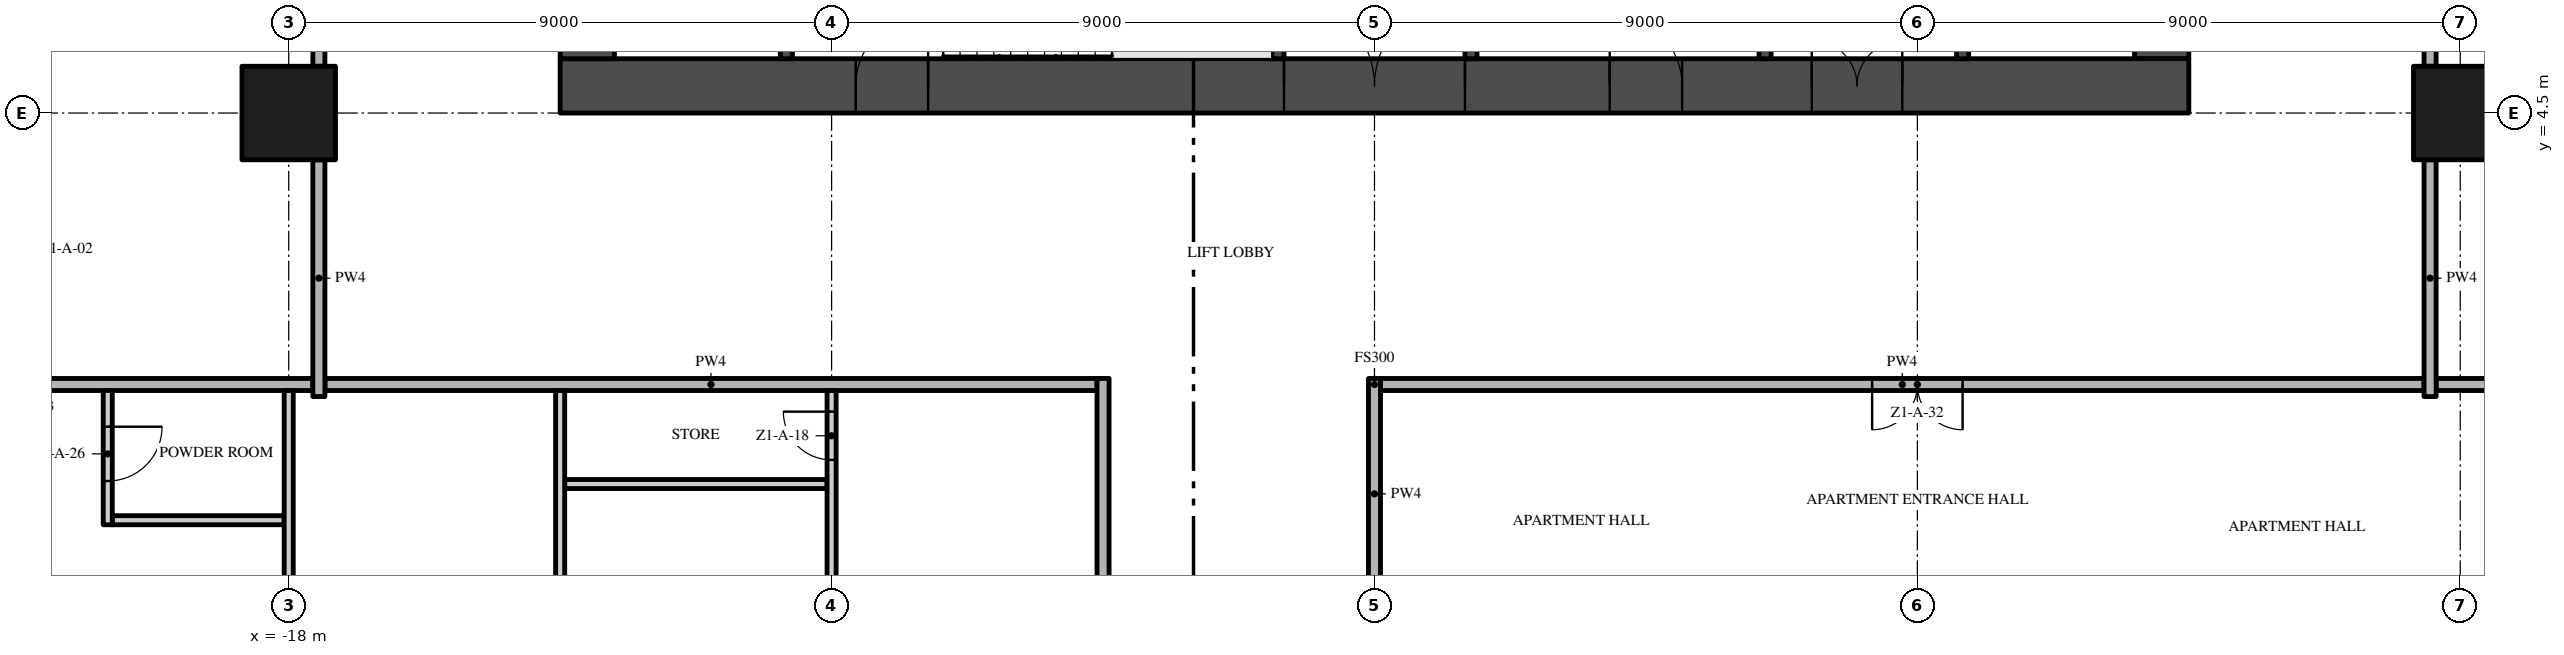
"""IFC4 building model, lengths in metres.
Left out: names, types, materials, properties, quantities, classifications, styles, units other than length and angle.
Written with IfcOpenShell. Run it as: python <this file> out.ifc"""

import sys

from ifc_helpers import new_model, si_unit, direction, frame, frame_2d, origin, origin_2d, place, context, subcontext, project, spatial, rectangle, extrude, element, fill, save


model = new_model("IFC4")
c1 = context("Model", 3, precision=1e-05, world=origin(), true_north=direction((0.0, 1.0)))
c2 = subcontext(c1, "Body", "Model", "MODEL_VIEW")
j1 = project(units=[si_unit("LENGTHUNIT", "METRE"), si_unit("PLANEANGLEUNIT", "RADIAN")], contexts=[c1])
p1 = place(None, origin())
s1 = spatial("IfcSite", under=j1, at=p1, CompositionType="ELEMENT")
p2 = place(p1, origin())
s2 = spatial("IfcBuilding", under=s1, at=p2, CompositionType="ELEMENT")
p3 = place(p2, frame((0.0, 0.0, 22.6)))
s3 = spatial("IfcBuildingStorey", under=s2, at=p3, CompositionType="ELEMENT", Elevation=22.6)
p4 = place(p3, frame((-13.5, 4.95, -0.3), z_axis=(0.0, 0.0, 1.0), x_axis=(1.0, 0.0, 0.0)))
e1 = element("IfcWall", 1, at=p4, inside=s3, PredefinedType="SHEAR", context=c2, shape_type="SweptSolid", body=[
    extrude(rectangle(XDim=27.0, YDim=0.9, at=frame_2d((13.5, 0.0))), origin(), (0.0, 0.0, 1.0), 3.8),
])
p5 = place(p4, frame((12.0, 0.0, 0.3)))
e2 = element("IfcOpeningElement", 2, at=p5, cuts=e1, PredefinedType="OPENING", context=c2, shape_type="SweptSolid", body=[
    extrude(rectangle(XDim=3.0, YDim=2.4, at=frame_2d((1.5, 1.2))), frame((0.0, 0.46, 0.0), z_axis=(0.0, -1.0, 0.0), x_axis=(1.0, 0.0, 0.0)), (0.0, 0.0, 1.0), 0.92),
])
p6 = place(p4, frame((4.9, 0.0, 0.3)))
e3 = element("IfcOpeningElement", 3, at=p6, cuts=e1, PredefinedType="OPENING", context=c2, shape_type="SweptSolid", body=[
    extrude(rectangle(XDim=1.2, YDim=2.2, at=frame_2d((0.6, 1.1))), frame((0.0, 0.46, 0.0), z_axis=(0.0, -1.0, 0.0), x_axis=(1.0, 0.0, 0.0)), (0.0, 0.0, 1.0), 0.92),
])
p7 = place(p4, frame((20.75, 0.0, 0.3)))
e4 = element("IfcOpeningElement", 4, at=p7, cuts=e1, PredefinedType="OPENING", context=c2, shape_type="SweptSolid", body=[
    extrude(rectangle(XDim=1.5, YDim=2.2, at=frame_2d((0.75, 1.1))), frame((0.0, 0.46, 0.0), z_axis=(0.0, -1.0, 0.0), x_axis=(1.0, 0.0, 0.0)), (0.0, 0.0, 1.0), 0.92),
])
p8 = place(p4, frame((17.4, 0.0, 0.3)))
e5 = element("IfcOpeningElement", 5, at=p8, cuts=e1, PredefinedType="OPENING", context=c2, shape_type="SweptSolid", body=[
    extrude(rectangle(XDim=1.2, YDim=2.2, at=frame_2d((0.6, 1.1))), frame((0.0, 0.46, 0.0), z_axis=(0.0, -1.0, 0.0), x_axis=(1.0, 0.0, 0.0)), (0.0, 0.0, 1.0), 0.92),
])
p9 = place(p3, frame((13.05, 5.4, -0.3), z_axis=(0.0, 0.0, 1.0), x_axis=(0.0, 1.0, 0.0)))
e6 = element("IfcWall", 6, at=p9, inside=s3, PredefinedType="SHEAR", context=c2, shape_type="SweptSolid", body=[
    extrude(rectangle(XDim=16.2, YDim=0.9, at=frame_2d((8.1, 0.0))), origin(), (0.0, 0.0, 1.0), 3.8),
])
p10 = place(p9, frame((6.0, 0.0, 0.3)))
e7 = element("IfcOpeningElement", 7, at=p10, cuts=e6, PredefinedType="OPENING", context=c2, shape_type="SweptSolid", body=[
    extrude(rectangle(XDim=1.2, YDim=2.2, at=frame_2d((0.6, 1.1))), frame((0.0, 0.46, 0.0), z_axis=(0.0, -1.0, 0.0), x_axis=(1.0, 0.0, 0.0)), (0.0, 0.0, 1.0), 0.92),
])
p11 = place(p3, frame((-13.05, 21.6, -0.3), z_axis=(0.0, 0.0, 1.0), x_axis=(0.0, -1.0, 0.0)))
e8 = element("IfcWall", 8, at=p11, inside=s3, PredefinedType="SHEAR", context=c2, shape_type="SweptSolid", body=[
    extrude(rectangle(XDim=16.2, YDim=0.9, at=frame_2d((8.1, 0.0))), origin(), (0.0, 0.0, 1.0), 3.8),
])
p12 = place(p11, frame((9.0, 0.0, 0.3)))
e9 = element("IfcOpeningElement", 9, at=p12, cuts=e8, PredefinedType="OPENING", context=c2, shape_type="SweptSolid", body=[
    extrude(rectangle(XDim=1.2, YDim=2.2, at=frame_2d((0.6, 1.1))), frame((0.0, 0.46, 0.0), z_axis=(0.0, -1.0, 0.0), x_axis=(1.0, 0.0, 0.0)), (0.0, 0.0, 1.0), 0.92),
])
for number, where, z_axis, x_axis in (
    (10, (-18.0, 4.5, 0.0), (0.0, 0.0, 1.0), (1.0, 0.0, 0.0)),
    (11, (18.0, 4.5, 0.0), (0.0, 0.0, 1.0), (1.0, 0.0, 0.0)),
):
    element("IfcColumn", number, at=place(p3, frame(where, z_axis=z_axis, x_axis=x_axis)), inside=s3, PredefinedType="COLUMN", context=c2, shape_type="SweptSolid", body=[
        extrude(rectangle(XDim=1.55, YDim=1.55, at=origin_2d()), origin(), (0.0, 0.0, 1.0), 3.5),
    ])
for number, where, z_axis, x_axis in (
    (12, (-9.75, 5.4, 0.0), (0.0, 0.0, 1.0), (0.0, 1.0, 0.0)),
    (13, (-1.6, 5.4, 0.0), (0.0, 0.0, 1.0), (0.0, 1.0, 0.0)),
):
    element("IfcWall", number, at=place(p3, frame(where, z_axis=z_axis, x_axis=x_axis)), inside=s3, PredefinedType="SHEAR", context=c2, shape_type="SweptSolid", body=[
        extrude(rectangle(XDim=2.55, YDim=0.2, at=frame_2d((1.275, 0.0))), origin(), (0.0, 0.0, 1.0), 3.5),
    ])
p13 = place(p3, frame((1.6, 11.5, 0.0), z_axis=(0.0, 0.0, 1.0), x_axis=(0.0, -1.0, 0.0)))
e14 = element("IfcWall", 14, at=p13, inside=s3, PredefinedType="SHEAR", context=c2, shape_type="SweptSolid", body=[
    extrude(rectangle(XDim=6.1, YDim=0.2, at=frame_2d((3.05, 0.0))), origin(), (0.0, 0.0, 1.0), 3.5),
])
p14 = place(p13, frame((2.2, 0.0, 0.0)))
e15 = element("IfcOpeningElement", 15, at=p14, cuts=e14, PredefinedType="OPENING", context=c2, shape_type="SweptSolid", body=[
    extrude(rectangle(XDim=0.9, YDim=2.1, at=frame_2d((0.45, 1.05))), frame((0.0, 0.11, 0.0), z_axis=(0.0, -1.0, 0.0), x_axis=(1.0, 0.0, 0.0)), (0.0, 0.0, 1.0), 0.22),
])
p15 = place(p3, frame((6.475, 5.4, 0.0), z_axis=(0.0, 0.0, 1.0), x_axis=(0.0, 1.0, 0.0)))
e16 = element("IfcWall", 16, at=p15, inside=s3, PredefinedType="SHEAR", context=c2, shape_type="SweptSolid", body=[
    extrude(rectangle(XDim=6.1, YDim=0.2, at=frame_2d((3.05, 0.0))), origin(), (0.0, 0.0, 1.0), 3.5),
])
p16 = place(p3, frame((9.75, 5.4, 0.0), z_axis=(0.0, 0.0, 1.0), x_axis=(0.0, 1.0, 0.0)))
e17 = element("IfcWall", 17, at=p16, inside=s3, PredefinedType="SHEAR", context=c2, shape_type="SweptSolid", body=[
    extrude(rectangle(XDim=2.2, YDim=0.2, at=frame_2d((1.1, 0.0))), origin(), (0.0, 0.0, 1.0), 3.5),
])
p17 = place(p16, frame((0.55, 0.0, 0.0)))
e18 = element("IfcOpeningElement", 18, at=p17, cuts=e17, PredefinedType="OPENING", context=c2, shape_type="SweptSolid", body=[
    extrude(rectangle(XDim=1.1, YDim=2.1, at=frame_2d((0.55, 1.05))), frame((0.0, 0.11, 0.0), z_axis=(0.0, -1.0, 0.0), x_axis=(1.0, 0.0, 0.0)), (0.0, 0.0, 1.0), 0.22),
])
p18 = place(p3, frame((-20.925, -2.25, 0.0), z_axis=(0.0, 0.0, 1.0), x_axis=(1.0, 0.0, 0.0)))
e19 = element("IfcWall", 19, at=p18, inside=s3, PredefinedType="PARTITIONING", context=c2, shape_type="SweptSolid", body=[
    extrude(rectangle(XDim=2.85, YDim=0.15, at=frame_2d((1.425, 0.0))), origin(), (0.0, 0.0, 1.0), 3.5),
])
p19 = place(p3, frame((-13.425, -1.65, 0.0), z_axis=(0.0, 0.0, 1.0), x_axis=(1.0, 0.0, 0.0)))
e20 = element("IfcWall", 20, at=p19, inside=s3, PredefinedType="PARTITIONING", context=c2, shape_type="SweptSolid", body=[
    extrude(rectangle(XDim=4.35, YDim=0.15, at=frame_2d((2.175, 0.0))), origin(), (0.0, 0.0, 1.0), 3.5),
])
p20 = place(p3, frame((-17.4, 0.0, 0.0), z_axis=(0.0, 0.0, 1.0), x_axis=(1.0, 0.0, 0.0)))
e21 = element("IfcWall", 21, at=p20, inside=s3, PredefinedType="PARTITIONING", context=c2, shape_type="SweptSolid", body=[
    extrude(rectangle(XDim=12.8, YDim=0.2, at=frame_2d((6.4, 0.0))), origin(), (0.0, 0.0, 1.0), 3.5),
])
p21 = place(p3, frame((17.4, 0.0, 0.0), z_axis=(0.0, 0.0, 1.0), x_axis=(-1.0, 0.0, 0.0)))
e22 = element("IfcWall", 22, at=p21, inside=s3, PredefinedType="PARTITIONING", context=c2, shape_type="SweptSolid", body=[
    extrude(rectangle(XDim=17.3, YDim=0.2, at=frame_2d((8.65, 0.0))), origin(), (0.0, 0.0, 1.0), 3.5),
])
p22 = place(p21, frame((7.65, 0.0, 0.0)))
e23 = element("IfcOpeningElement", 23, at=p22, cuts=e22, PredefinedType="OPENING", context=c2, shape_type="SweptSolid", body=[
    extrude(rectangle(XDim=1.5, YDim=2.4, at=frame_2d((0.75, 1.2))), frame((0.0, 0.11, 0.0), z_axis=(0.0, -1.0, 0.0), x_axis=(1.0, 0.0, 0.0)), (0.0, 0.0, 1.0), 0.22),
])
for number, where, z_axis, x_axis in (
    (24, (-26.7, 0.0, 0.0), (0.0, 0.0, 1.0), (1.0, 0.0, 0.0)),
    (25, (17.6, 0.0, 0.0), (0.0, 0.0, 1.0), (1.0, 0.0, 0.0)),
):
    element("IfcWall", number, at=place(p3, frame(where, z_axis=z_axis, x_axis=x_axis)), inside=s3, PredefinedType="PARTITIONING", context=c2, shape_type="SweptSolid", body=[
        extrude(rectangle(XDim=9.1, YDim=0.2, at=frame_2d((4.55, 0.0))), origin(), (0.0, 0.0, 1.0), 3.5),
    ])
p23 = place(p3, frame((-21.0, -0.1, 0.0), z_axis=(0.0, 0.0, 1.0), x_axis=(0.0, -1.0, 0.0)))
e26 = element("IfcWall", 26, at=p23, inside=s3, PredefinedType="PARTITIONING", context=c2, shape_type="SweptSolid", body=[
    extrude(rectangle(XDim=2.225, YDim=0.15, at=frame_2d((1.113, 0.0))), origin(), (0.0, 0.0, 1.0), 3.5),
])
p24 = place(p23, frame((0.6, 0.0, 0.0)))
e27 = element("IfcOpeningElement", 27, at=p24, cuts=e26, PredefinedType="OPENING", context=c2, shape_type="SweptSolid", body=[
    extrude(rectangle(XDim=0.9, YDim=2.1, at=frame_2d((0.45, 1.05))), frame((0.0, 0.085, 0.0), z_axis=(0.0, -1.0, 0.0), x_axis=(1.0, 0.0, 0.0)), (0.0, 0.0, 1.0), 0.17),
])
p25 = place(p3, frame((-18.0, -3.725, 0.0), z_axis=(0.0, 0.0, 1.0), x_axis=(0.0, 1.0, 0.0)))
e28 = element("IfcWall", 28, at=p25, inside=s3, PredefinedType="PARTITIONING", context=c2, shape_type="SweptSolid", body=[
    extrude(rectangle(XDim=3.625, YDim=0.15, at=frame_2d((1.812, 0.0))), origin(), (0.0, 0.0, 1.0), 3.5),
])
p26 = place(p3, frame((-17.5, -0.2, 0.0), z_axis=(0.0, 0.0, 1.0), x_axis=(0.0, 1.0, 0.0)))
e29 = element("IfcWall", 29, at=p26, inside=s3, PredefinedType="PARTITIONING", context=c2, shape_type="SweptSolid", body=[
    extrude(rectangle(XDim=3.925, YDim=0.2, at=frame_2d((1.962, 0.0))), origin(), (0.0, 0.0, 1.0), 3.5),
])
p27 = place(p3, frame((-17.5, 5.275, 0.0), z_axis=(0.0, 0.0, 1.0), x_axis=(0.0, 1.0, 0.0)))
e30 = element("IfcWall", 30, at=p27, inside=s3, PredefinedType="PARTITIONING", context=c2, shape_type="SweptSolid", body=[
    extrude(rectangle(XDim=7.45, YDim=0.2, at=frame_2d((3.725, 0.0))), origin(), (0.0, 0.0, 1.0), 3.5),
])
p28 = place(p3, frame((-13.5, -9.975, 0.0), z_axis=(0.0, 0.0, 1.0), x_axis=(0.0, 1.0, 0.0)))
e31 = element("IfcWall", 31, at=p28, inside=s3, PredefinedType="PARTITIONING", context=c2, shape_type="SweptSolid", body=[
    extrude(rectangle(XDim=9.875, YDim=0.15, at=frame_2d((4.938, 0.0))), origin(), (0.0, 0.0, 1.0), 3.5),
])
p29 = place(p3, frame((-9.0, -3.725, 0.0), z_axis=(0.0, 0.0, 1.0), x_axis=(0.0, 1.0, 0.0)))
e32 = element("IfcWall", 32, at=p29, inside=s3, PredefinedType="PARTITIONING", context=c2, shape_type="SweptSolid", body=[
    extrude(rectangle(XDim=3.625, YDim=0.15, at=frame_2d((1.812, 0.0))), origin(), (0.0, 0.0, 1.0), 3.5),
])
p30 = place(p29, frame((2.475, 0.0, 0.0)))
e33 = element("IfcOpeningElement", 33, at=p30, cuts=e32, PredefinedType="OPENING", context=c2, shape_type="SweptSolid", body=[
    extrude(rectangle(XDim=0.8, YDim=2.0, at=frame_2d((0.4, 1.0))), frame((0.0, 0.085, 0.0), z_axis=(0.0, -1.0, 0.0), x_axis=(1.0, 0.0, 0.0)), (0.0, 0.0, 1.0), 0.17),
])
p31 = place(p3, frame((-4.5, -22.2, 0.0), z_axis=(0.0, 0.0, 1.0), x_axis=(0.0, 1.0, 0.0)))
e34 = element("IfcWall", 34, at=p31, inside=s3, PredefinedType="PARTITIONING", context=c2, shape_type="SweptSolid", body=[
    extrude(rectangle(XDim=22.3, YDim=0.2, at=frame_2d((11.15, 0.0))), origin(), (0.0, 0.0, 1.0), 3.5),
])
p32 = place(p31, frame((10.2, 0.0, 0.0)))
e35 = element("IfcOpeningElement", 35, at=p32, cuts=e34, PredefinedType="OPENING", context=c2, shape_type="SweptSolid", body=[
    extrude(rectangle(XDim=1.5, YDim=2.4, at=frame_2d((0.75, 1.2))), frame((0.0, 0.11, 0.0), z_axis=(0.0, -1.0, 0.0), x_axis=(1.0, 0.0, 0.0)), (0.0, 0.0, 1.0), 0.22),
])
p33 = place(p3, frame((0.0, -3.725, 0.0), z_axis=(0.0, 0.0, 1.0), x_axis=(0.0, 1.0, 0.0)))
e36 = element("IfcWall", 36, at=p33, inside=s3, PredefinedType="PARTITIONING", context=c2, shape_type="SweptSolid", body=[
    extrude(rectangle(XDim=3.825, YDim=0.2, at=frame_2d((1.913, 0.0))), origin(), (0.0, 0.0, 1.0), 3.5),
])
p34 = place(p3, frame((17.5, -0.2, 0.0), z_axis=(0.0, 0.0, 1.0), x_axis=(0.0, 1.0, 0.0)))
e37 = element("IfcWall", 37, at=p34, inside=s3, PredefinedType="PARTITIONING", context=c2, shape_type="SweptSolid", body=[
    extrude(rectangle(XDim=3.925, YDim=0.2, at=frame_2d((1.962, 0.0))), origin(), (0.0, 0.0, 1.0), 3.5),
])
p35 = place(p3, frame((17.5, 5.275, 0.0), z_axis=(0.0, 0.0, 1.0), x_axis=(0.0, 1.0, 0.0)))
e38 = element("IfcWall", 38, at=p35, inside=s3, PredefinedType="PARTITIONING", context=c2, shape_type="SweptSolid", body=[
    extrude(rectangle(XDim=7.45, YDim=0.2, at=frame_2d((3.725, 0.0))), origin(), (0.0, 0.0, 1.0), 3.5),
])
p36 = place(p5, frame((3.0, 0.0, 0.0), z_axis=(0.0, 0.0, 1.0), x_axis=(-1.0, 0.0, 0.0)))
e39 = element("IfcDoor", 39, at=p36, inside=s3, OperationType="DOUBLE_DOOR_SINGLE_SWING", PredefinedType="DOOR", context=c2, shape_type="SweptSolid", body=[
    extrude(rectangle(XDim=3.0, YDim=2.4, at=frame_2d((1.5, 1.2))), frame((0.0, 0.025, 0.0), z_axis=(0.0, -1.0, 0.0), x_axis=(1.0, 0.0, 0.0)), (0.0, 0.0, 1.0), 0.05),
])
fill(e2, e39)
p37 = place(p6, frame((1.2, 0.0, 0.0), z_axis=(0.0, 0.0, 1.0), x_axis=(-1.0, 0.0, 0.0)))
e40 = element("IfcDoor", 40, at=p37, inside=s3, OperationType="SINGLE_SWING_LEFT", PredefinedType="DOOR", context=c2, shape_type="SweptSolid", body=[
    extrude(rectangle(XDim=1.2, YDim=2.2, at=frame_2d((0.6, 1.1))), frame((0.0, 0.025, 0.0), z_axis=(0.0, -1.0, 0.0), x_axis=(1.0, 0.0, 0.0)), (0.0, 0.0, 1.0), 0.05),
])
fill(e3, e40)
p38 = place(p7, frame((1.5, 0.0, 0.0), z_axis=(0.0, 0.0, 1.0), x_axis=(-1.0, 0.0, 0.0)))
e41 = element("IfcDoor", 41, at=p38, inside=s3, OperationType="DOUBLE_DOOR_SINGLE_SWING", PredefinedType="DOOR", context=c2, shape_type="SweptSolid", body=[
    extrude(rectangle(XDim=1.5, YDim=2.2, at=frame_2d((0.75, 1.1))), frame((0.0, 0.025, 0.0), z_axis=(0.0, -1.0, 0.0), x_axis=(1.0, 0.0, 0.0)), (0.0, 0.0, 1.0), 0.05),
])
fill(e4, e41)
p39 = place(p8, frame((1.2, 0.0, 0.0), z_axis=(0.0, 0.0, 1.0), x_axis=(-1.0, 0.0, 0.0)))
e42 = element("IfcDoor", 42, at=p39, inside=s3, OperationType="SINGLE_SWING_RIGHT", PredefinedType="DOOR", context=c2, shape_type="SweptSolid", body=[
    extrude(rectangle(XDim=1.2, YDim=2.2, at=frame_2d((0.6, 1.1))), frame((0.0, 0.025, 0.0), z_axis=(0.0, -1.0, 0.0), x_axis=(1.0, 0.0, 0.0)), (0.0, 0.0, 1.0), 0.05),
])
fill(e5, e42)
p40 = place(p30, origin())
e43 = element("IfcDoor", 43, at=p40, inside=s3, OperationType="SINGLE_SWING_RIGHT", PredefinedType="DOOR", context=c2, shape_type="SweptSolid", body=[
    extrude(rectangle(XDim=0.8, YDim=2.0, at=frame_2d((0.4, 1.0))), frame((0.0, 0.025, 0.0), z_axis=(0.0, -1.0, 0.0), x_axis=(1.0, 0.0, 0.0)), (0.0, 0.0, 1.0), 0.05),
])
fill(e33, e43)
p41 = place(p24, origin())
e44 = element("IfcDoor", 44, at=p41, inside=s3, OperationType="SINGLE_SWING_LEFT", PredefinedType="DOOR", context=c2, shape_type="SweptSolid", body=[
    extrude(rectangle(XDim=0.9, YDim=2.1, at=frame_2d((0.45, 1.05))), frame((0.0, 0.025, 0.0), z_axis=(0.0, -1.0, 0.0), x_axis=(1.0, 0.0, 0.0)), (0.0, 0.0, 1.0), 0.05),
])
fill(e27, e44)
p42 = place(p22, origin())
e45 = element("IfcDoor", 45, at=p42, inside=s3, OperationType="DOUBLE_DOOR_SINGLE_SWING", PredefinedType="DOOR", context=c2, shape_type="SweptSolid", body=[
    extrude(rectangle(XDim=1.5, YDim=2.4, at=frame_2d((0.75, 1.2))), frame((0.0, 0.025, 0.0), z_axis=(0.0, -1.0, 0.0), x_axis=(1.0, 0.0, 0.0)), (0.0, 0.0, 1.0), 0.05),
])
fill(e23, e45)
save(model, sys.argv[1])
